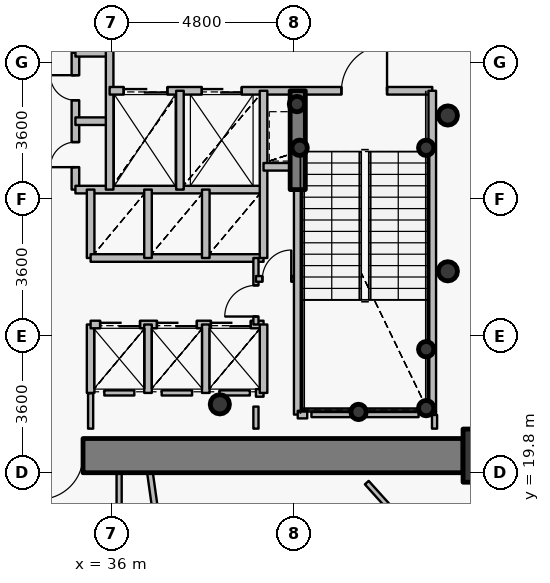
"""IFC4 building model, lengths in metres.
Left out: names, types, materials, properties, quantities, classifications, styles, units other than length and angle.
Written with IfcOpenShell. Run it as: python <this file> out.ifc"""

import sys

from ifc_helpers import new_model, si_unit, direction, frame, frame_2d, origin, origin_2d, place, context, subcontext, project, spatial, rectangle, hollow_circle, extrude, source, transform, mapped, element, fill, save


model = new_model("IFC4")
c1 = context("Model", 3, precision=1e-05, world=origin(), true_north=direction((0.0, 1.0)))
c2 = subcontext(c1, "Body", "Model", "MODEL_VIEW")
j1 = project(units=[si_unit("LENGTHUNIT", "METRE"), si_unit("PLANEANGLEUNIT", "RADIAN")], contexts=[c1])
p1 = place(None, origin())
s1 = spatial("IfcSite", under=j1, at=p1, CompositionType="ELEMENT")
p2 = place(p1, origin())
s2 = spatial("IfcBuilding", under=s1, at=p2, CompositionType="ELEMENT")
p3 = place(p2, frame((0.0, 0.0, 45.0)))
s3 = spatial("IfcBuildingStorey", under=s2, at=p3, CompositionType="ELEMENT", Elevation=45.0)
p4 = place(p3, frame((45.95, 20.25, 0.0), z_axis=(0.0, 0.0, 1.0), x_axis=(1.0, 0.0, 0.0)))
e1 = element("IfcColumn", 1, at=p4, inside=s3, PredefinedType="COLUMN", context=c2, shape_type="SweptSolid", body=[
    extrude(rectangle(XDim=1.4, YDim=1.4, at=origin_2d()), origin(), (0.0, 0.0, 1.0), 4.2),
])
p5 = place(p3, frame((38.85, 21.6, 0.0), z_axis=(0.0, 0.0, 1.0), x_axis=(1.0, 0.0, 0.0)))
e2 = element("IfcColumn", 2, at=p5, inside=s3, PredefinedType="COLUMN", context=c2, shape_type="SweptSolid", body=[
    extrude(hollow_circle(Radius=0.254, WallThickness=0.02, at=origin_2d()), origin(), (0.0, 0.0, 1.0), 4.2),
])
for number, where, z_axis, x_axis in (
    (3, (44.28, 21.5, 0.0), (0.0, 0.0, 1.0), (1.0, 0.0, 0.0)),
    (4, (44.28, 23.05, 0.0), (0.0, 0.0, 1.0), (1.0, 0.0, 0.0)),
    (5, (42.5, 21.4, 0.0), (0.0, 0.0, 1.0), (1.0, 0.0, 0.0)),
    (6, (40.95, 28.35, 0.0), (0.0, 0.0, 1.0), (1.0, 0.0, 0.0)),
    (7, (44.28, 28.35, 0.0), (0.0, 0.0, 1.0), (1.0, 0.0, 0.0)),
    (8, (40.88, 29.5, 0.0), (0.0, 0.0, 1.0), (1.0, 0.0, 0.0)),
):
    element("IfcColumn", number, at=place(p3, frame(where, z_axis=z_axis, x_axis=x_axis)), inside=s3, PredefinedType="COLUMN", context=c2, shape_type="SweptSolid", body=[
        extrude(hollow_circle(Radius=0.203, WallThickness=0.016, at=origin_2d()), origin(), (0.0, 0.0, 1.0), 4.2),
    ])
p6 = place(p3, frame((45.25, 20.25, 0.0), z_axis=(0.0, 0.0, 1.0), x_axis=(-1.0, 0.0, 0.0)))
e9 = element("IfcWall", 9, at=p6, inside=s3, PredefinedType="SHEAR", context=c2, shape_type="SweptSolid", body=[
    extrude(rectangle(XDim=18.5, YDim=0.9, at=frame_2d((9.25, 0.0))), origin(), (0.0, 0.0, 1.0), 3.4),
])
p7 = place(p6, frame((10.0, 0.0, 0.0)))
e10 = element("IfcOpeningElement", 10, at=p7, cuts=e9, PredefinedType="OPENING", context=c2, shape_type="SweptSolid", body=[
    extrude(rectangle(XDim=1.15, YDim=2.15, at=origin_2d()), frame((0.575, 0.46, 1.075), z_axis=(0.0, -1.0, 0.0), x_axis=(1.0, 0.0, 0.0)), (0.0, 0.0, 1.0), 0.92),
])
p8 = place(p3, frame((40.9, 27.25, 0.0), z_axis=(0.0, 0.0, 1.0), x_axis=(0.0, 1.0, 0.0)))
e11 = element("IfcWall", 11, at=p8, inside=s3, PredefinedType="SHEAR", context=c2, shape_type="SweptSolid", body=[
    extrude(rectangle(XDim=2.6, YDim=0.4, at=frame_2d((1.3, 0.0))), origin(), (0.0, 0.0, 1.0), 3.55),
])
for number, where, z_axis, x_axis in (
    (12, (44.85, 25.1, 0.0), (0.0, 0.0, 1.0), (1.0, 0.0, 0.0)),
    (13, (44.85, 29.2, 0.0), (0.0, 0.0, 1.0), (1.0, 0.0, 0.0)),
):
    element("IfcColumn", number, at=place(p3, frame(where, z_axis=z_axis, x_axis=x_axis)), inside=s3, PredefinedType="COLUMN", context=c2, shape_type="SweptSolid", body=[
        extrude(hollow_circle(Radius=0.254, WallThickness=0.02, at=origin_2d()), origin(), (0.0, 0.0, 1.0), 4.2),
    ])
p9 = place(p3, frame((35.05, 27.25, 0.0), z_axis=(0.0, 0.0, 1.0), x_axis=(0.0, 1.0, 0.0)))
e14 = element("IfcWall", 14, at=p9, inside=s3, PredefinedType="PARTITIONING", context=c2, shape_type="SweptSolid", body=[
    extrude(rectangle(XDim=3.6, YDim=0.2, at=frame_2d((1.8, 0.0))), origin(), (0.0, 0.0, 1.0), 3.95),
])
p10 = place(p9, frame((0.59, 0.0, 0.0)))
e15 = element("IfcOpeningElement", 15, at=p10, cuts=e14, PredefinedType="OPENING", context=c2, shape_type="SweptSolid", body=[
    extrude(rectangle(XDim=0.66, YDim=2.05, at=origin_2d()), frame((0.33, 0.11, 1.025), z_axis=(0.0, -1.0, 0.0), x_axis=(1.0, 0.0, 0.0)), (0.0, 0.0, 1.0), 0.22),
])
p11 = place(p9, frame((2.35, 0.0, 0.0)))
e16 = element("IfcOpeningElement", 16, at=p11, cuts=e14, PredefinedType="OPENING", context=c2, shape_type="SweptSolid", body=[
    extrude(rectangle(XDim=0.66, YDim=2.05, at=origin_2d()), frame((0.33, 0.11, 1.025), z_axis=(0.0, -1.0, 0.0), x_axis=(1.0, 0.0, 0.0)), (0.0, 0.0, 1.0), 0.22),
])
p12 = place(p3, frame((35.05, 27.25, 0.0), z_axis=(0.0, 0.0, 1.0), x_axis=(1.0, 0.0, 0.0)))
e17 = element("IfcWall", 17, at=p12, inside=s3, PredefinedType="PARTITIONING", context=c2, shape_type="SweptSolid", body=[
    extrude(rectangle(XDim=4.95, YDim=0.2, at=frame_2d((2.475, 0.0))), origin(), (0.0, 0.0, 1.0), 3.535),
])
for number, where, z_axis, x_axis in (
    (18, (35.05, 29.05, 0.0), (0.0, 0.0, 1.0), (1.0, 0.0, 0.0)),
    (19, (35.05, 30.85, 0.0), (0.0, 0.0, 1.0), (1.0, 0.0, 0.0)),
):
    element("IfcWall", number, at=place(p3, frame(where, z_axis=z_axis, x_axis=x_axis)), inside=s3, PredefinedType="PARTITIONING", context=c2, shape_type="SweptSolid", body=[
        extrude(rectangle(XDim=0.9, YDim=0.2, at=frame_2d((0.45, 0.0))), origin(), (0.0, 0.0, 1.0), 3.95),
    ])
p13 = place(p3, frame((35.45, 21.9, 0.0), z_axis=(0.0, 0.0, 1.0), x_axis=(0.0, 1.0, 0.0)))
e20 = element("IfcWall", 20, at=p13, inside=s3, PredefinedType="PARTITIONING", context=c2, shape_type="SweptSolid", body=[
    extrude(rectangle(XDim=1.8, YDim=0.2, at=frame_2d((0.9, 0.0))), origin(), (0.0, 0.0, 1.0), 3.95),
])
p14 = place(p3, frame((35.45, 23.7, 0.0), z_axis=(0.0, 0.0, 1.0), x_axis=(1.0, 0.0, 0.0)))
e21 = element("IfcWall", 21, at=p14, inside=s3, PredefinedType="PARTITIONING", context=c2, shape_type="SweptSolid", body=[
    extrude(rectangle(XDim=4.55, YDim=0.2, at=frame_2d((2.275, 0.0))), origin(), (0.0, 0.0, 1.0), 3.535),
])
p15 = place(p14, frame((0.25, 0.0, 0.0)))
e22 = element("IfcOpeningElement", 22, at=p15, cuts=e21, PredefinedType="OPENING", context=c2, shape_type="SweptSolid", body=[
    extrude(rectangle(XDim=1.05, YDim=2.15, at=origin_2d()), frame((0.525, 0.11, 1.075), z_axis=(0.0, -1.0, 0.0), x_axis=(1.0, 0.0, 0.0)), (0.0, 0.0, 1.0), 0.22),
])
p16 = place(p14, frame((1.745, 0.0, 0.0)))
e23 = element("IfcOpeningElement", 23, at=p16, cuts=e21, PredefinedType="OPENING", context=c2, shape_type="SweptSolid", body=[
    extrude(rectangle(XDim=1.05, YDim=2.15, at=origin_2d()), frame((0.525, 0.11, 1.075), z_axis=(0.0, -1.0, 0.0), x_axis=(1.0, 0.0, 0.0)), (0.0, 0.0, 1.0), 0.22),
])
p17 = place(p14, frame((3.165, 0.0, 0.0)))
e24 = element("IfcOpeningElement", 24, at=p17, cuts=e21, PredefinedType="OPENING", context=c2, shape_type="SweptSolid", body=[
    extrude(rectangle(XDim=1.05, YDim=2.15, at=origin_2d()), frame((0.525, 0.11, 1.075), z_axis=(0.0, -1.0, 0.0), x_axis=(1.0, 0.0, 0.0)), (0.0, 0.0, 1.0), 0.22),
])
p18 = place(p3, frame((35.45, 25.45, 0.0), z_axis=(0.0, 0.0, 1.0), x_axis=(0.0, 1.0, 0.0)))
e25 = element("IfcWall", 25, at=p18, inside=s3, PredefinedType="PARTITIONING", context=c2, shape_type="SweptSolid", body=[
    extrude(rectangle(XDim=1.8, YDim=0.2, at=frame_2d((0.9, 0.0))), origin(), (0.0, 0.0, 1.0), 3.95),
])
p19 = place(p3, frame((35.45, 25.45, 0.0), z_axis=(0.0, 0.0, 1.0), x_axis=(1.0, 0.0, 0.0)))
e26 = element("IfcWall", 26, at=p19, inside=s3, PredefinedType="PARTITIONING", context=c2, shape_type="SweptSolid", body=[
    extrude(rectangle(XDim=4.55, YDim=0.2, at=frame_2d((2.275, 0.0))), origin(), (0.0, 0.0, 1.0), 3.535),
])
p20 = place(p3, frame((35.95, 27.25, 0.0), z_axis=(0.0, 0.0, 1.0), x_axis=(0.0, 1.0, 0.0)))
e27 = element("IfcWall", 27, at=p20, inside=s3, PredefinedType="PARTITIONING", context=c2, shape_type="SweptSolid", body=[
    extrude(rectangle(XDim=3.8, YDim=0.2, at=frame_2d((1.9, 0.0))), origin(), (0.0, 0.0, 1.0), 3.95),
])
p21 = place(p3, frame((35.95, 29.85, 0.0), z_axis=(0.0, 0.0, 1.0), x_axis=(1.0, 0.0, 0.0)))
e28 = element("IfcWall", 28, at=p21, inside=s3, PredefinedType="PARTITIONING", context=c2, shape_type="SweptSolid", body=[
    extrude(rectangle(XDim=8.49, YDim=0.2, at=frame_2d((4.245, 0.0))), origin(), (0.0, 0.0, 1.0), 3.535),
])
p22 = place(p21, frame((6.1, 0.0, 0.0)))
e29 = element("IfcOpeningElement", 29, at=p22, cuts=e28, PredefinedType="OPENING", context=c2, shape_type="SweptSolid", body=[
    extrude(rectangle(XDim=1.2, YDim=2.15, at=origin_2d()), frame((0.6, 0.11, 1.075), z_axis=(0.0, -1.0, 0.0), x_axis=(1.0, 0.0, 0.0)), (0.0, 0.0, 1.0), 0.22),
])
p23 = place(p21, frame((0.37, 0.0, 0.0)))
e30 = element("IfcOpeningElement", 30, at=p23, cuts=e28, PredefinedType="OPENING", context=c2, shape_type="SweptSolid", body=[
    extrude(rectangle(XDim=1.15, YDim=2.15, at=origin_2d()), frame((0.575, 0.11, 1.075), z_axis=(0.0, -1.0, 0.0), x_axis=(1.0, 0.0, 0.0)), (0.0, 0.0, 1.0), 0.22),
])
p24 = place(p21, frame((2.425, 0.0, 0.0)))
e31 = element("IfcOpeningElement", 31, at=p24, cuts=e28, PredefinedType="OPENING", context=c2, shape_type="SweptSolid", body=[
    extrude(rectangle(XDim=1.05, YDim=2.15, at=origin_2d()), frame((0.525, 0.11, 1.075), z_axis=(0.0, -1.0, 0.0), x_axis=(1.0, 0.0, 0.0)), (0.0, 0.0, 1.0), 0.22),
])
p25 = place(p3, frame((36.2, 17.9, 0.0), z_axis=(0.0, 0.0, 1.0), x_axis=(0.0, 1.0, 0.0)))
e32 = element("IfcWall", 32, at=p25, inside=s3, PredefinedType="PARTITIONING", context=c2, shape_type="SweptSolid", body=[
    extrude(rectangle(XDim=1.9, YDim=0.135, at=frame_2d((0.95, 0.0))), origin(), (0.0, 0.0, 1.0), 3.285),
])
for number, where, z_axis, x_axis in (
    (33, (36.96, 21.9, 0.0), (0.0, 0.0, 1.0), (0.0, 1.0, 0.0)),
    (34, (36.96, 25.45, 0.0), (0.0, 0.0, 1.0), (0.0, 1.0, 0.0)),
):
    element("IfcWall", number, at=place(p3, frame(where, z_axis=z_axis, x_axis=x_axis)), inside=s3, PredefinedType="PARTITIONING", context=c2, shape_type="SweptSolid", body=[
        extrude(rectangle(XDim=1.8, YDim=0.2, at=frame_2d((0.9, 0.0))), origin(), (0.0, 0.0, 1.0), 3.95),
    ])
p26 = place(p3, frame((37.012, 19.8, 0.0), z_axis=(0.0, 0.0, 1.0), x_axis=(0.139168038406, -0.990268780224, 0.0)))
e35 = element("IfcWall", 35, at=p26, inside=s3, PredefinedType="PARTITIONING", context=c2, shape_type="SweptSolid", body=[
    extrude(rectangle(XDim=17.067, YDim=0.15, at=frame_2d((8.534, 0.0))), origin(), (0.0, 0.0, 1.0), 3.335),
])
p27 = place(p3, frame((37.8, 27.25, 0.0), z_axis=(0.0, 0.0, 1.0), x_axis=(0.0, 1.0, 0.0)))
e36 = element("IfcWall", 36, at=p27, inside=s3, PredefinedType="PARTITIONING", context=c2, shape_type="SweptSolid", body=[
    extrude(rectangle(XDim=2.6, YDim=0.2, at=frame_2d((1.3, 0.0))), origin(), (0.0, 0.0, 1.0), 3.95),
])
for number, where, z_axis, x_axis in (
    (37, (38.48, 21.9, 0.0), (0.0, 0.0, 1.0), (0.0, 1.0, 0.0)),
    (38, (38.48, 25.45, 0.0), (0.0, 0.0, 1.0), (0.0, 1.0, 0.0)),
):
    element("IfcWall", number, at=place(p3, frame(where, z_axis=z_axis, x_axis=x_axis)), inside=s3, PredefinedType="PARTITIONING", context=c2, shape_type="SweptSolid", body=[
        extrude(rectangle(XDim=1.8, YDim=0.2, at=frame_2d((0.9, 0.0))), origin(), (0.0, 0.0, 1.0), 3.95),
    ])
p28 = place(p3, frame((39.8, 21.9, 0.0), z_axis=(0.0, 0.0, 1.0), x_axis=(1.0, 0.0, 0.0)))
e39 = element("IfcWall", 39, at=p28, inside=s3, PredefinedType="PARTITIONING", context=c2, shape_type="SweptSolid", body=[
    extrude(rectangle(XDim=0.2, YDim=0.2, at=frame_2d((0.1, 0.0))), origin(), (0.0, 0.0, 1.0), 3.95),
])
p29 = place(p3, frame((39.8, 23.7, 0.0), z_axis=(0.0, 0.0, 1.0), x_axis=(0.0, 1.0, 0.0)))
e40 = element("IfcWall", 40, at=p29, inside=s3, PredefinedType="PARTITIONING", context=c2, shape_type="SweptSolid", body=[
    extrude(rectangle(XDim=1.75, YDim=0.135, at=frame_2d((0.875, 0.0))), origin(), (0.0, 0.0, 1.0), 3.95),
])
p30 = place(p29, frame((0.21, 0.0, 0.0)))
e41 = element("IfcOpeningElement", 41, at=p30, cuts=e40, PredefinedType="OPENING", context=c2, shape_type="SweptSolid", body=[
    extrude(rectangle(XDim=0.82, YDim=2.1, at=origin_2d()), frame((0.41, 0.078, 1.05), z_axis=(0.0, -1.0, 0.0), x_axis=(1.0, 0.0, 0.0)), (0.0, 0.0, 1.0), 0.155),
])
p31 = place(p3, frame((39.8, 24.9, 0.0), z_axis=(0.0, 0.0, 1.0), x_axis=(1.0, 0.0, 0.0)))
e42 = element("IfcWall", 42, at=p31, inside=s3, PredefinedType="PARTITIONING", context=c2, shape_type="SweptSolid", body=[
    extrude(rectangle(XDim=1.1, YDim=0.15, at=frame_2d((0.55, 0.0))), origin(), (0.0, 0.0, 1.0), 3.95),
])
p32 = place(p31, frame((0.17, 0.0, 0.0)))
e43 = element("IfcOpeningElement", 43, at=p32, cuts=e42, PredefinedType="OPENING", context=c2, shape_type="SweptSolid", body=[
    extrude(rectangle(XDim=0.76, YDim=2.1, at=origin_2d()), frame((0.38, 0.085, 1.05), z_axis=(0.0, -1.0, 0.0), x_axis=(1.0, 0.0, 0.0)), (0.0, 0.0, 1.0), 0.17),
])
p33 = place(p3, frame((40.0, 21.9, 0.0), z_axis=(0.0, 0.0, 1.0), x_axis=(0.0, 1.0, 0.0)))
e44 = element("IfcWall", 44, at=p33, inside=s3, PredefinedType="PARTITIONING", context=c2, shape_type="SweptSolid", body=[
    extrude(rectangle(XDim=1.8, YDim=0.2, at=frame_2d((0.9, 0.0))), origin(), (0.0, 0.0, 1.0), 3.95),
])
p34 = place(p3, frame((40.0, 25.45, 0.0), z_axis=(0.0, 0.0, 1.0), x_axis=(0.0, 1.0, 0.0)))
e45 = element("IfcWall", 45, at=p34, inside=s3, PredefinedType="PARTITIONING", context=c2, shape_type="SweptSolid", body=[
    extrude(rectangle(XDim=4.4, YDim=0.2, at=frame_2d((2.2, 0.0))), origin(), (0.0, 0.0, 1.0), 3.95),
])
p35 = place(p3, frame((40.0, 27.85, 0.0), z_axis=(0.0, 0.0, 1.0), x_axis=(1.0, 0.0, 0.0)))
e46 = element("IfcWall", 46, at=p35, inside=s3, PredefinedType="PARTITIONING", context=c2, shape_type="SweptSolid", body=[
    extrude(rectangle(XDim=0.9, YDim=0.2, at=frame_2d((0.45, 0.0))), origin(), (0.0, 0.0, 1.0), 3.95),
])
p36 = place(p3, frame((40.9, 21.33, 0.0), z_axis=(0.0, 0.0, 1.0), x_axis=(0.0, 1.0, 0.0)))
e47 = element("IfcWall", 47, at=p36, inside=s3, PredefinedType="PARTITIONING", context=c2, shape_type="SweptSolid", body=[
    extrude(rectangle(XDim=5.91, YDim=0.2, at=frame_2d((2.955, 0.0))), origin(), (0.0, 0.0, 1.0), 3.485),
])
p37 = place(p3, frame((40.9, 21.33, 0.0), z_axis=(0.0, 0.0, 1.0), x_axis=(1.0, 0.0, 0.0)))
e48 = element("IfcWall", 48, at=p37, inside=s3, PredefinedType="PARTITIONING", context=c2, shape_type="SweptSolid", body=[
    extrude(rectangle(XDim=0.25, YDim=0.2, at=frame_2d((0.125, 0.0))), origin(), (0.0, 0.0, 1.0), 3.485),
])
p38 = place(p3, frame((44.44, 21.33, 0.0), z_axis=(0.0, 0.0, 1.0), x_axis=(0.0, 1.0, 0.0)))
e49 = element("IfcWall", 49, at=p38, inside=s3, PredefinedType="PARTITIONING", context=c2, shape_type="SweptSolid", body=[
    extrude(rectangle(XDim=8.52, YDim=0.2, at=frame_2d((4.26, 0.0))), origin(), (0.0, 0.0, 1.0), 3.95),
])
p39 = place(p3, frame((44.08, 21.33, 0.0), z_axis=(0.0, 0.0, 1.0), x_axis=(-1.0, 0.0, 0.0)))
e50 = element("IfcWall", 50, at=p39, inside=s3, PredefinedType="PARTITIONING", context=c2, shape_type="SweptSolid", body=[
    extrude(rectangle(XDim=2.82, YDim=0.135, at=frame_2d((1.41, 0.0))), origin(), (0.0, 0.0, 1.0), 3.485),
])
p40 = place(p3, frame((36.6, 21.9, 0.0), z_axis=(0.0, 0.0, 1.0), x_axis=(-1.0, 0.0, 0.0)))
e51 = element("IfcWall", 51, at=p40, inside=s3, PredefinedType="PARTITIONING", context=c2, shape_type="SweptSolid", body=[
    extrude(rectangle(XDim=0.79, YDim=0.135, at=frame_2d((0.395, 0.0))), origin(), (0.0, 0.0, 1.0), 3.95),
])
p41 = place(p3, frame((38.12, 21.9, 0.0), z_axis=(0.0, 0.0, 1.0), x_axis=(-1.0, 0.0, 0.0)))
e52 = element("IfcWall", 52, at=p41, inside=s3, PredefinedType="PARTITIONING", context=c2, shape_type="SweptSolid", body=[
    extrude(rectangle(XDim=0.8, YDim=0.135, at=frame_2d((0.4, 0.0))), origin(), (0.0, 0.0, 1.0), 3.95),
])
p42 = place(p3, frame((39.64, 21.9, 0.0), z_axis=(0.0, 0.0, 1.0), x_axis=(-1.0, 0.0, 0.0)))
e53 = element("IfcWall", 53, at=p42, inside=s3, PredefinedType="PARTITIONING", context=c2, shape_type="SweptSolid", body=[
    extrude(rectangle(XDim=0.8, YDim=0.135, at=frame_2d((0.4, 0.0))), origin(), (0.0, 0.0, 1.0), 3.535),
])
p43 = place(p3, frame((39.8, 20.96, 0.0), z_axis=(0.0, 0.0, 1.0), x_axis=(0.0, 1.0, 0.0)))
e54 = element("IfcWall", 54, at=p43, inside=s3, PredefinedType="PARTITIONING", context=c2, shape_type="SweptSolid", body=[
    extrude(rectangle(XDim=0.58, YDim=0.135, at=frame_2d((0.29, 0.0))), origin(), (0.0, 0.0, 1.0), 3.485),
])
p44 = place(p3, frame((44.5, 20.96, 0.0), z_axis=(0.0, 0.0, 1.0), x_axis=(0.0, 1.0, 0.0)))
e55 = element("IfcWall", 55, at=p44, inside=s3, PredefinedType="PARTITIONING", context=c2, shape_type="SweptSolid", body=[
    extrude(rectangle(XDim=0.36, YDim=0.135, at=frame_2d((0.18, 0.0))), origin(), (0.0, 0.0, 1.0), 3.95),
])
p45 = place(p3, frame((35.45, 21.89, 0.0), z_axis=(0.0, 0.0, 1.0), x_axis=(0.0, -1.0, 0.0)))
e56 = element("IfcWall", 56, at=p45, inside=s3, PredefinedType="PARTITIONING", context=c2, shape_type="SweptSolid", body=[
    extrude(rectangle(XDim=0.93, YDim=0.135, at=frame_2d((0.465, 0.0))), origin(), (0.0, 0.0, 1.0), 3.535),
])
p46 = place(p3, frame((42.717, 19.54, 0.0), z_axis=(0.0, 0.0, 1.0), x_axis=(0.669122827361, -0.743151829645, 0.0)))
e57 = element("IfcWall", 57, at=p46, inside=s3, PredefinedType="PARTITIONING", context=c2, shape_type="SweptSolid", body=[
    extrude(rectangle(XDim=4.521, YDim=0.135, at=frame_2d((2.261, 0.0))), origin(), (0.0, 0.0, 1.0), 3.95),
])
m1 = source(origin(), c2, "Body", "SweptSolid", [
    extrude(rectangle(XDim=1.15, YDim=2.15, at=origin_2d()), frame((0.575, 0.025, 1.075), z_axis=(0.0, -1.0, 0.0), x_axis=(1.0, 0.0, 0.0)), (0.0, 0.0, 1.0), 0.05),
])
p47 = place(p7, origin())
e58 = element("IfcDoor", 58, at=p47, inside=s3, OperationType="SINGLE_SWING_RIGHT", PredefinedType="DOOR", context=c2, shape_type="MappedRepresentation", body=[
    mapped(m1, transform((0.0, 0.0, 0.0), x_axis=(1.0, 0.0, 0.0), y_axis=(0.0, 1.0, 0.0), z_axis=(0.0, 0.0, 1.0), scale=1.0)),
])
fill(e10, e58)
m2 = source(origin(), c2, "Body", "SweptSolid", [
    extrude(rectangle(XDim=1.2, YDim=2.15, at=origin_2d()), frame((0.6, 0.025, 1.075), z_axis=(0.0, -1.0, 0.0), x_axis=(1.0, 0.0, 0.0)), (0.0, 0.0, 1.0), 0.05),
])
p48 = place(p22, origin())
e59 = element("IfcDoor", 59, at=p48, inside=s3, OperationType="SINGLE_SWING_RIGHT", PredefinedType="DOOR", context=c2, shape_type="MappedRepresentation", body=[
    mapped(m2, transform((0.0, 0.0, 0.0), x_axis=(1.0, 0.0, 0.0), y_axis=(0.0, 1.0, 0.0), z_axis=(0.0, 0.0, 1.0), scale=1.0)),
])
fill(e29, e59)
m3 = source(origin(), c2, "Body", "SweptSolid", [
    extrude(rectangle(XDim=1.15, YDim=2.15, at=origin_2d()), frame((0.575, 0.025, 1.075), z_axis=(0.0, -1.0, 0.0), x_axis=(1.0, 0.0, 0.0)), (0.0, 0.0, 1.0), 0.05),
])
p49 = place(p23, origin())
e60 = element("IfcDoor", 60, at=p49, inside=s3, OperationType="DOUBLE_DOOR_SLIDING", PredefinedType="USERDEFINED", context=c2, shape_type="MappedRepresentation", body=[
    mapped(m3, transform((0.0, 0.0, 0.0), x_axis=(1.0, 0.0, 0.0), y_axis=(0.0, 1.0, 0.0), z_axis=(0.0, 0.0, 1.0), scale=1.0)),
])
fill(e30, e60)
m4 = source(origin(), c2, "Body", "SweptSolid", [
    extrude(rectangle(XDim=1.05, YDim=2.15, at=origin_2d()), frame((0.525, 0.025, 1.075), z_axis=(0.0, -1.0, 0.0), x_axis=(1.0, 0.0, 0.0)), (0.0, 0.0, 1.0), 0.05),
])
p50 = place(p24, origin())
e61 = element("IfcDoor", 61, at=p50, inside=s3, OperationType="DOUBLE_DOOR_SLIDING", PredefinedType="USERDEFINED", context=c2, shape_type="MappedRepresentation", body=[
    mapped(m4, transform((0.0, 0.0, 0.0), x_axis=(1.0, 0.0, 0.0), y_axis=(0.0, 1.0, 0.0), z_axis=(0.0, 0.0, 1.0), scale=1.0)),
])
fill(e31, e61)
p51 = place(p15, origin())
e62 = element("IfcDoor", 62, at=p51, inside=s3, OperationType="DOUBLE_DOOR_SLIDING", PredefinedType="USERDEFINED", context=c2, shape_type="MappedRepresentation", body=[
    mapped(m4, transform((0.0, 0.0, 0.0), x_axis=(1.0, 0.0, 0.0), y_axis=(0.0, 1.0, 0.0), z_axis=(0.0, 0.0, 1.0), scale=1.0)),
])
fill(e22, e62)
p52 = place(p16, origin())
e63 = element("IfcDoor", 63, at=p52, inside=s3, OperationType="DOUBLE_DOOR_SLIDING", PredefinedType="USERDEFINED", context=c2, shape_type="MappedRepresentation", body=[
    mapped(m4, transform((0.0, 0.0, 0.0), x_axis=(1.0, 0.0, 0.0), y_axis=(0.0, 1.0, 0.0), z_axis=(0.0, 0.0, 1.0), scale=1.0)),
])
fill(e23, e63)
p53 = place(p17, origin())
e64 = element("IfcDoor", 64, at=p53, inside=s3, OperationType="DOUBLE_DOOR_SLIDING", PredefinedType="USERDEFINED", context=c2, shape_type="MappedRepresentation", body=[
    mapped(m4, transform((0.0, 0.0, 0.0), x_axis=(1.0, 0.0, 0.0), y_axis=(0.0, 1.0, 0.0), z_axis=(0.0, 0.0, 1.0), scale=1.0)),
])
fill(e24, e64)
m5 = source(origin(), c2, "Body", "SweptSolid", [
    extrude(rectangle(XDim=0.66, YDim=2.05, at=origin_2d()), frame((0.33, 0.025, 1.025), z_axis=(0.0, -1.0, 0.0), x_axis=(1.0, 0.0, 0.0)), (0.0, 0.0, 1.0), 0.05),
])
p54 = place(p10, origin())
e65 = element("IfcDoor", 65, at=p54, inside=s3, OperationType="SINGLE_SWING_LEFT", PredefinedType="USERDEFINED", context=c2, shape_type="MappedRepresentation", body=[
    mapped(m5, transform((0.0, 0.0, 0.0), x_axis=(1.0, 0.0, 0.0), y_axis=(0.0, 1.0, 0.0), z_axis=(0.0, 0.0, 1.0), scale=1.0)),
])
fill(e15, e65)
p55 = place(p11, origin())
e66 = element("IfcDoor", 66, at=p55, inside=s3, OperationType="SINGLE_SWING_RIGHT", PredefinedType="USERDEFINED", context=c2, shape_type="MappedRepresentation", body=[
    mapped(m5, transform((0.0, 0.0, 0.0), x_axis=(1.0, 0.0, 0.0), y_axis=(0.0, 1.0, 0.0), z_axis=(0.0, 0.0, 1.0), scale=1.0)),
])
fill(e16, e66)
m6 = source(origin(), c2, "Body", "SweptSolid", [
    extrude(rectangle(XDim=0.82, YDim=2.1, at=origin_2d()), frame((0.41, 0.025, 1.05), z_axis=(0.0, -1.0, 0.0), x_axis=(1.0, 0.0, 0.0)), (0.0, 0.0, 1.0), 0.05),
])
p56 = place(p30, origin())
e67 = element("IfcDoor", 67, at=p56, inside=s3, OperationType="SINGLE_SWING_LEFT", PredefinedType="DOOR", context=c2, shape_type="MappedRepresentation", body=[
    mapped(m6, transform((0.0, 0.0, 0.0), x_axis=(1.0, 0.0, 0.0), y_axis=(0.0, 1.0, 0.0), z_axis=(0.0, 0.0, 1.0), scale=1.0)),
])
fill(e41, e67)
m7 = source(origin(), c2, "Body", "SweptSolid", [
    extrude(rectangle(XDim=0.76, YDim=2.1, at=origin_2d()), frame((0.38, 0.025, 1.05), z_axis=(0.0, -1.0, 0.0), x_axis=(1.0, 0.0, 0.0)), (0.0, 0.0, 1.0), 0.05),
])
p57 = place(p32, origin())
e68 = element("IfcDoor", 68, at=p57, inside=s3, OperationType="SINGLE_SWING_RIGHT", PredefinedType="DOOR", context=c2, shape_type="MappedRepresentation", body=[
    mapped(m7, transform((0.0, 0.0, 0.0), x_axis=(1.0, 0.0, 0.0), y_axis=(0.0, 1.0, 0.0), z_axis=(0.0, 0.0, 1.0), scale=1.0)),
])
fill(e43, e68)
save(model, sys.argv[1])
